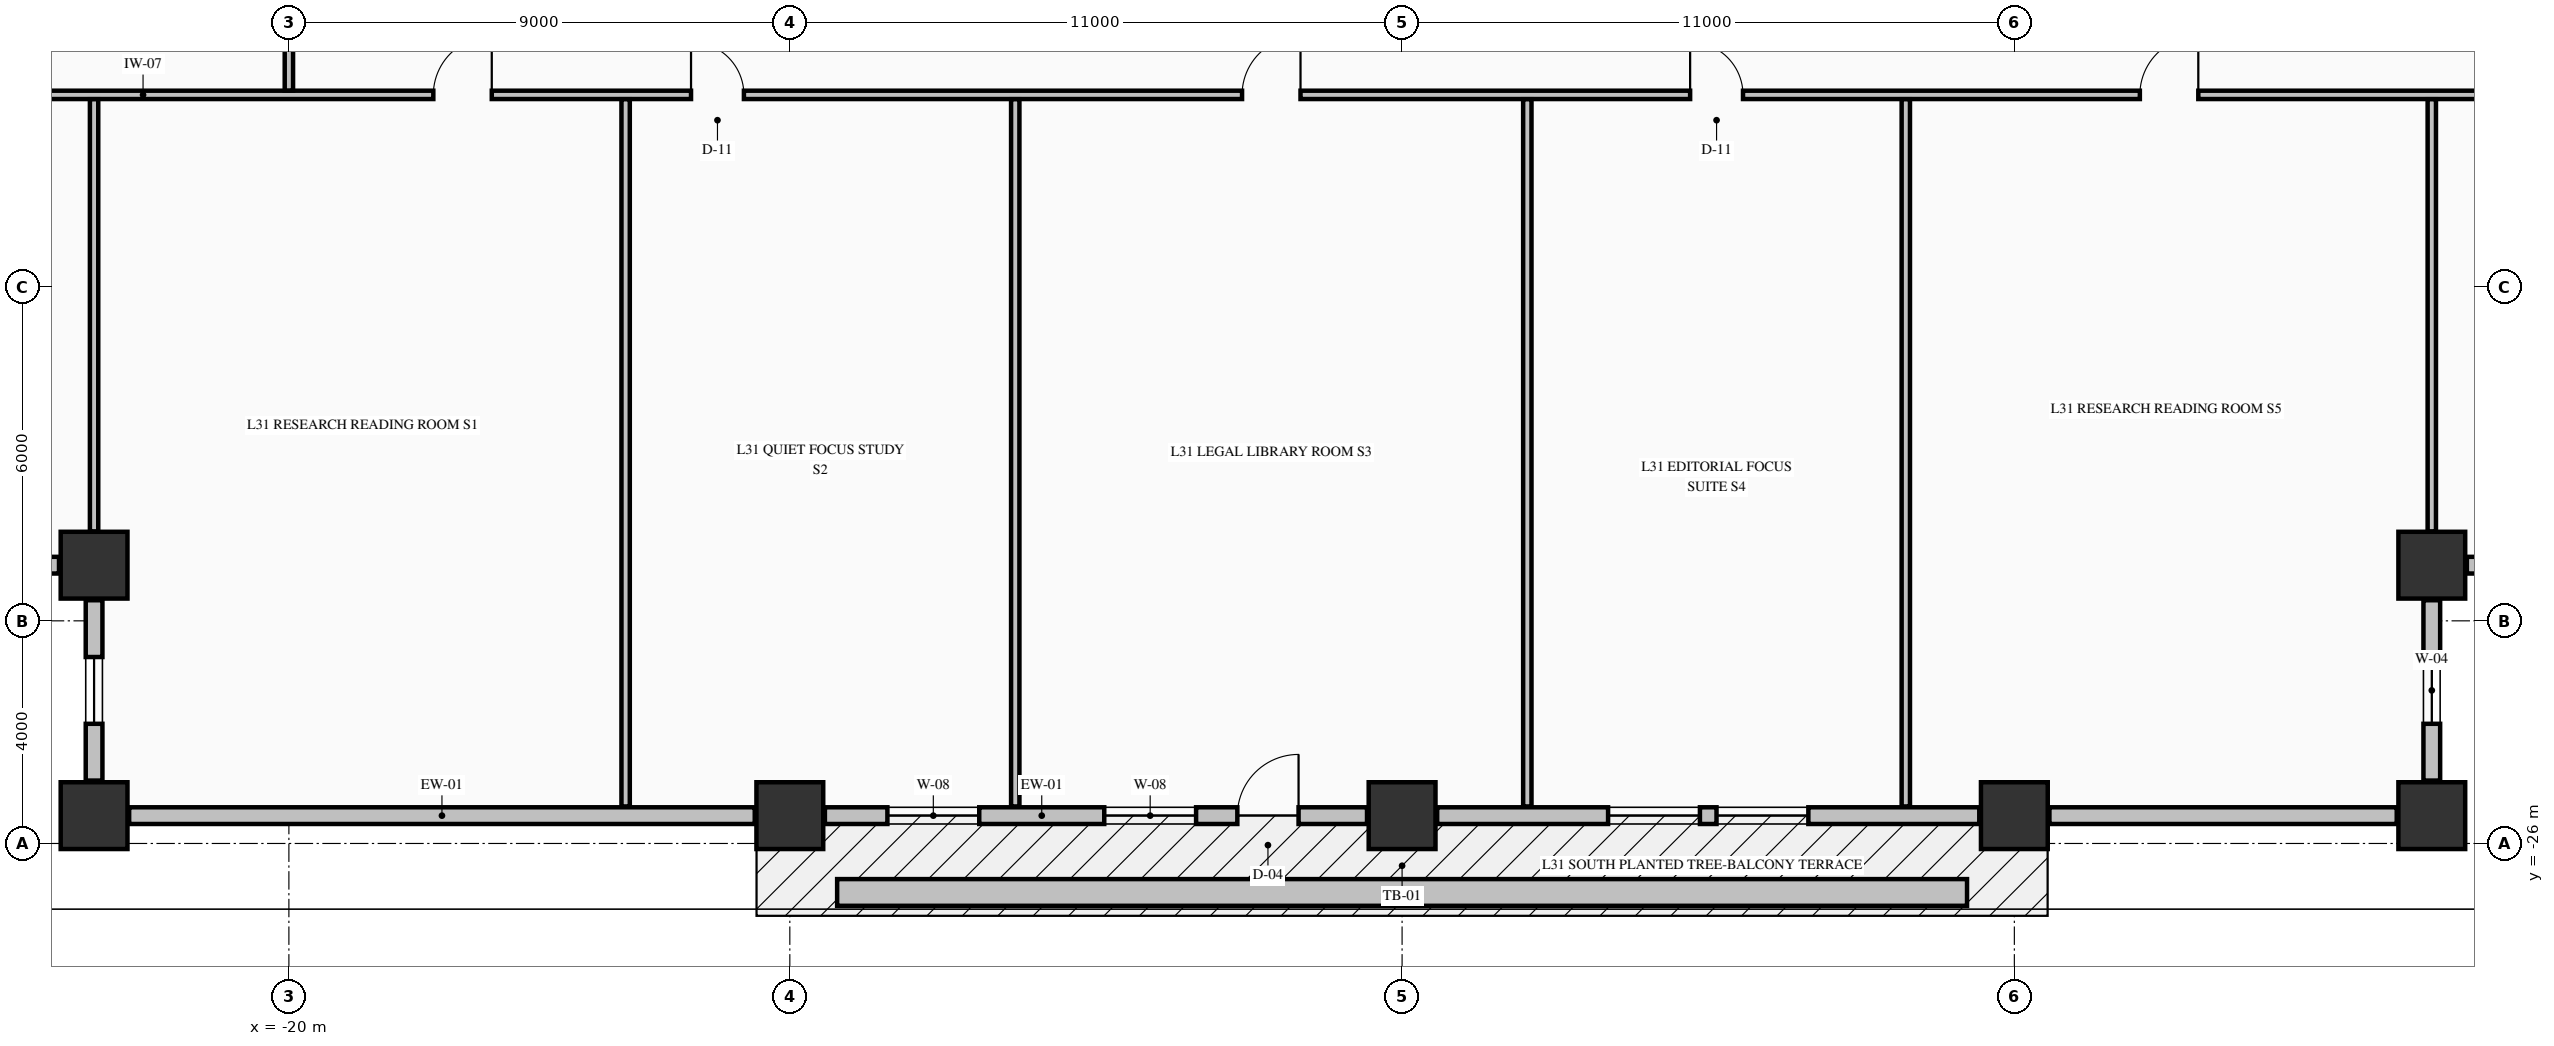
"""IFC4 building model, lengths in metres.
Left out: names, types, materials, properties, quantities, classifications, styles, units other than length and angle.
Written with IfcOpenShell. Run it as: python <this file> out.ifc"""

import sys

from ifc_helpers import new_model, si_unit, direction, frame, frame_2d, origin, origin_2d, place, context, subcontext, project, spatial, rectangle, extrude, element, fill, save


model = new_model("IFC4")
c1 = context("Model", 3, precision=1e-05, world=origin(), true_north=direction((0.0, 1.0)))
c2 = subcontext(c1, "Body", "Model", "MODEL_VIEW")
j1 = project(units=[si_unit("LENGTHUNIT", "METRE"), si_unit("PLANEANGLEUNIT", "RADIAN")], contexts=[c1])
p1 = place(None, origin())
s1 = spatial("IfcSite", under=j1, at=p1, CompositionType="ELEMENT")
p2 = place(p1, origin())
s2 = spatial("IfcBuilding", under=s1, at=p2, CompositionType="ELEMENT")
p3 = place(p2, frame((0.0, 0.0, 124.92)))
s3 = spatial("IfcBuildingStorey", under=s2, at=p3, CompositionType="ELEMENT", Elevation=124.92)
for number, where, z_axis, x_axis in (
    (1, (-23.5, -25.5, -0.25), (0.0, 0.0, 1.0), (1.0, 0.0, 0.0)),
    (2, (-11.0, -25.5, -0.25), (0.0, 0.0, 1.0), (1.0, 0.0, 0.0)),
    (3, (0.0, -25.5, -0.25), (0.0, 0.0, 1.0), (1.0, 0.0, 0.0)),
    (4, (11.0, -25.5, -0.25), (0.0, 0.0, 1.0), (1.0, 0.0, 0.0)),
    (5, (18.5, -25.5, -0.25), (0.0, 0.0, 1.0), (1.0, 0.0, 0.0)),
    (6, (-23.5, -21.0, -0.25), (0.0, 0.0, 1.0), (1.0, 0.0, 0.0)),
    (7, (18.5, -21.0, -0.25), (0.0, 0.0, 1.0), (1.0, 0.0, 0.0)),
):
    element("IfcColumn", number, at=place(p3, frame(where, z_axis=z_axis, x_axis=x_axis)), inside=s3, PredefinedType="COLUMN", context=c2, shape_type="SweptSolid", body=[
        extrude(rectangle(XDim=1.2, YDim=1.2, at=origin_2d()), origin(), (0.0, 0.0, 1.0), 3.57),
    ])
p4 = place(p3, frame((18.5, -24.87, 0.0), z_axis=(0.0, 0.0, 1.0), x_axis=(0.0, 1.0, 0.0)))
e8 = element("IfcWall", 8, at=p4, inside=s3, PredefinedType="STANDARD", context=c2, shape_type="SweptSolid", body=[
    extrude(rectangle(XDim=3.24, YDim=0.3, at=frame_2d((1.62, 0.0))), origin(), (0.0, 0.0, 1.0), 2.712),
])
p5 = place(p4, frame((1.02, 0.0, 0.82)))
e9 = element("IfcOpeningElement", 9, at=p5, cuts=e8, PredefinedType="OPENING", context=c2, shape_type="SweptSolid", body=[
    extrude(rectangle(XDim=1.2, YDim=1.65, at=frame_2d((0.6, 0.825))), frame((0.0, 0.16, 0.0), z_axis=(0.0, -1.0, 0.0), x_axis=(1.0, 0.0, 0.0)), (0.0, 0.0, 1.0), 0.32),
])
p6 = place(p3, frame((19.13, -21.0, 0.0), z_axis=(0.0, 0.0, 1.0), x_axis=(1.0, 0.0, 0.0)))
e10 = element("IfcWall", 10, at=p6, inside=s3, PredefinedType="STANDARD", context=c2, shape_type="SweptSolid", body=[
    extrude(rectangle(XDim=3.24, YDim=0.3, at=frame_2d((1.62, 0.0))), origin(), (0.0, 0.0, 1.0), 2.712),
])
p7 = place(p6, frame((1.02, 0.0, 0.82)))
e11 = element("IfcOpeningElement", 11, at=p7, cuts=e10, PredefinedType="OPENING", context=c2, shape_type="SweptSolid", body=[
    extrude(rectangle(XDim=1.2, YDim=1.65, at=frame_2d((0.6, 0.825))), frame((0.0, 0.16, 0.0), z_axis=(0.0, -1.0, 0.0), x_axis=(1.0, 0.0, 0.0)), (0.0, 0.0, 1.0), 0.32),
])
p8 = place(p3, frame((-27.37, -21.0, 0.0), z_axis=(0.0, 0.0, 1.0), x_axis=(1.0, 0.0, 0.0)))
e12 = element("IfcWall", 12, at=p8, inside=s3, PredefinedType="STANDARD", context=c2, shape_type="SweptSolid", body=[
    extrude(rectangle(XDim=3.24, YDim=0.3, at=frame_2d((1.62, 0.0))), origin(), (0.0, 0.0, 1.0), 2.712),
])
p9 = place(p8, frame((1.02, 0.0, 0.82)))
e13 = element("IfcOpeningElement", 13, at=p9, cuts=e12, PredefinedType="OPENING", context=c2, shape_type="SweptSolid", body=[
    extrude(rectangle(XDim=1.2, YDim=1.65, at=frame_2d((0.6, 0.825))), frame((0.0, 0.16, 0.0), z_axis=(0.0, -1.0, 0.0), x_axis=(1.0, 0.0, 0.0)), (0.0, 0.0, 1.0), 0.32),
])
p10 = place(p3, frame((-23.5, -21.63, 0.0), z_axis=(0.0, 0.0, 1.0), x_axis=(0.0, -1.0, 0.0)))
e14 = element("IfcWall", 14, at=p10, inside=s3, PredefinedType="STANDARD", context=c2, shape_type="SweptSolid", body=[
    extrude(rectangle(XDim=3.24, YDim=0.3, at=frame_2d((1.62, 0.0))), origin(), (0.0, 0.0, 1.0), 2.712),
])
p11 = place(p10, frame((1.02, 0.0, 0.82)))
e15 = element("IfcOpeningElement", 15, at=p11, cuts=e14, PredefinedType="OPENING", context=c2, shape_type="SweptSolid", body=[
    extrude(rectangle(XDim=1.2, YDim=1.65, at=frame_2d((0.6, 0.825))), frame((0.0, 0.16, 0.0), z_axis=(0.0, -1.0, 0.0), x_axis=(1.0, 0.0, 0.0)), (0.0, 0.0, 1.0), 0.32),
])
p12 = place(p3, frame((-22.87, -25.5, 0.0), z_axis=(0.0, 0.0, 1.0), x_axis=(1.0, 0.0, 0.0)))
e16 = element("IfcWall", 16, at=p12, inside=s3, PredefinedType="STANDARD", context=c2, shape_type="SweptSolid", body=[
    extrude(rectangle(XDim=11.24, YDim=0.3, at=frame_2d((5.62, 0.0))), origin(), (0.0, 0.0, 1.0), 2.712),
])
p13 = place(p3, frame((-10.37, -25.5, 0.0), z_axis=(0.0, 0.0, 1.0), x_axis=(1.0, 0.0, 0.0)))
e17 = element("IfcWall", 17, at=p13, inside=s3, PredefinedType="STANDARD", context=c2, shape_type="SweptSolid", body=[
    extrude(rectangle(XDim=9.74, YDim=0.3, at=frame_2d((4.87, 0.0))), origin(), (0.0, 0.0, 1.0), 2.712),
])
p14 = place(p13, frame((7.41, 0.0, 0.0)))
e18 = element("IfcOpeningElement", 18, at=p14, cuts=e17, PredefinedType="OPENING", context=c2, shape_type="SweptSolid", body=[
    extrude(rectangle(XDim=1.1, YDim=2.15, at=frame_2d((0.55, 1.075))), frame((0.0, 0.16, 0.0), z_axis=(0.0, -1.0, 0.0), x_axis=(1.0, 0.0, 0.0)), (0.0, 0.0, 1.0), 0.32),
])
p15 = place(p13, frame((1.123, 0.0, 0.8)))
e19 = element("IfcOpeningElement", 19, at=p15, cuts=e17, PredefinedType="OPENING", context=c2, shape_type="SweptSolid", body=[
    extrude(rectangle(XDim=1.65, YDim=1.7, at=frame_2d((0.825, 0.85))), frame((0.0, 0.16, 0.0), z_axis=(0.0, -1.0, 0.0), x_axis=(1.0, 0.0, 0.0)), (0.0, 0.0, 1.0), 0.32),
])
p16 = place(p13, frame((5.019, 0.0, 0.8)))
e20 = element("IfcOpeningElement", 20, at=p16, cuts=e17, PredefinedType="OPENING", context=c2, shape_type="SweptSolid", body=[
    extrude(rectangle(XDim=1.65, YDim=1.7, at=frame_2d((0.825, 0.85))), frame((0.0, 0.16, 0.0), z_axis=(0.0, -1.0, 0.0), x_axis=(1.0, 0.0, 0.0)), (0.0, 0.0, 1.0), 0.32),
])
p17 = place(p3, frame((0.63, -25.5, 0.0), z_axis=(0.0, 0.0, 1.0), x_axis=(1.0, 0.0, 0.0)))
e21 = element("IfcWall", 21, at=p17, inside=s3, PredefinedType="STANDARD", context=c2, shape_type="SweptSolid", body=[
    extrude(rectangle(XDim=9.74, YDim=0.3, at=frame_2d((4.87, 0.0))), origin(), (0.0, 0.0, 1.0), 2.712),
])
p18 = place(p17, frame((3.071, 0.0, 0.8)))
e22 = element("IfcOpeningElement", 22, at=p18, cuts=e21, PredefinedType="OPENING", context=c2, shape_type="SweptSolid", body=[
    extrude(rectangle(XDim=1.65, YDim=1.7, at=frame_2d((0.825, 0.85))), frame((0.0, 0.16, 0.0), z_axis=(0.0, -1.0, 0.0), x_axis=(1.0, 0.0, 0.0)), (0.0, 0.0, 1.0), 0.32),
])
p19 = place(p17, frame((5.019, 0.0, 0.8)))
e23 = element("IfcOpeningElement", 23, at=p19, cuts=e21, PredefinedType="OPENING", context=c2, shape_type="SweptSolid", body=[
    extrude(rectangle(XDim=1.65, YDim=1.7, at=frame_2d((0.825, 0.85))), frame((0.0, 0.16, 0.0), z_axis=(0.0, -1.0, 0.0), x_axis=(1.0, 0.0, 0.0)), (0.0, 0.0, 1.0), 0.32),
])
p20 = place(p3, frame((11.63, -25.5, 0.0), z_axis=(0.0, 0.0, 1.0), x_axis=(1.0, 0.0, 0.0)))
e24 = element("IfcWall", 24, at=p20, inside=s3, PredefinedType="STANDARD", context=c2, shape_type="SweptSolid", body=[
    extrude(rectangle(XDim=6.24, YDim=0.3, at=frame_2d((3.12, 0.0))), origin(), (0.0, 0.0, 1.0), 2.712),
])
p21 = place(p3, frame((-27.835, -12.55, 0.0), z_axis=(0.0, 0.0, 1.0), x_axis=(1.0, 0.0, 0.0)))
e25 = element("IfcWall", 25, at=p21, inside=s3, PredefinedType="PARTITIONING", context=c2, shape_type="SweptSolid", body=[
    extrude(rectangle(XDim=50.67, YDim=0.15, at=frame_2d((25.335, 0.0))), origin(), (0.0, 0.0, 1.0), 3.32),
])
p22 = place(p21, frame((10.43, 0.0, 0.0)))
e26 = element("IfcOpeningElement", 26, at=p22, cuts=e25, PredefinedType="OPENING", context=c2, shape_type="SweptSolid", body=[
    extrude(rectangle(XDim=1.05, YDim=2.15, at=frame_2d((0.525, 1.075))), frame((0.0, 0.085, 0.0), z_axis=(0.0, -1.0, 0.0), x_axis=(1.0, 0.0, 0.0)), (0.0, 0.0, 1.0), 0.17),
])
p23 = place(p21, frame((15.06, 0.0, 0.0)))
e27 = element("IfcOpeningElement", 27, at=p23, cuts=e25, PredefinedType="OPENING", context=c2, shape_type="SweptSolid", body=[
    extrude(rectangle(XDim=0.95, YDim=2.15, at=frame_2d((0.475, 1.075))), frame((0.0, 0.085, 0.0), z_axis=(0.0, -1.0, 0.0), x_axis=(1.0, 0.0, 0.0)), (0.0, 0.0, 1.0), 0.17),
])
p24 = place(p21, frame((24.96, 0.0, 0.0)))
e28 = element("IfcOpeningElement", 28, at=p24, cuts=e25, PredefinedType="OPENING", context=c2, shape_type="SweptSolid", body=[
    extrude(rectangle(XDim=1.05, YDim=2.15, at=frame_2d((0.525, 1.075))), frame((0.0, 0.085, 0.0), z_axis=(0.0, -1.0, 0.0), x_axis=(1.0, 0.0, 0.0)), (0.0, 0.0, 1.0), 0.17),
])
p25 = place(p21, frame((33.01, 0.0, 0.0)))
e29 = element("IfcOpeningElement", 29, at=p25, cuts=e25, PredefinedType="OPENING", context=c2, shape_type="SweptSolid", body=[
    extrude(rectangle(XDim=0.95, YDim=2.15, at=frame_2d((0.475, 1.075))), frame((0.0, 0.085, 0.0), z_axis=(0.0, -1.0, 0.0), x_axis=(1.0, 0.0, 0.0)), (0.0, 0.0, 1.0), 0.17),
])
p26 = place(p21, frame((41.09, 0.0, 0.0)))
e30 = element("IfcOpeningElement", 30, at=p26, cuts=e25, PredefinedType="OPENING", context=c2, shape_type="SweptSolid", body=[
    extrude(rectangle(XDim=1.05, YDim=2.15, at=frame_2d((0.525, 1.075))), frame((0.0, 0.085, 0.0), z_axis=(0.0, -1.0, 0.0), x_axis=(1.0, 0.0, 0.0)), (0.0, 0.0, 1.0), 0.17),
])
p27 = place(p3, frame((-23.5, -20.394, 0.0), z_axis=(0.0, 0.0, 1.0), x_axis=(0.0, 1.0, 0.0)))
e31 = element("IfcWall", 31, at=p27, inside=s3, PredefinedType="PARTITIONING", context=c2, shape_type="SweptSolid", body=[
    extrude(rectangle(XDim=7.766, YDim=0.15, at=frame_2d((3.883, 0.0))), origin(), (0.0, 0.0, 1.0), 3.32),
])
p28 = place(p3, frame((-20.0, -12.472, 0.0), z_axis=(0.0, 0.0, 1.0), x_axis=(0.0, 1.0, 0.0)))
e32 = element("IfcWall", 32, at=p28, inside=s3, PredefinedType="PARTITIONING", context=c2, shape_type="SweptSolid", body=[
    extrude(rectangle(XDim=2.016, YDim=0.15, at=frame_2d((1.008, 0.0))), origin(), (0.0, 0.0, 1.0), 2.81),
])
p29 = place(p28, frame((0.747, 0.0, 0.0)))
e33 = element("IfcOpeningElement", 33, at=p29, cuts=e32, PredefinedType="OPENING", context=c2, shape_type="SweptSolid", body=[
    extrude(rectangle(XDim=0.95, YDim=2.15, at=frame_2d((0.475, 1.075))), frame((0.0, 0.085, 0.0), z_axis=(0.0, -1.0, 0.0), x_axis=(1.0, 0.0, 0.0)), (0.0, 0.0, 1.0), 0.17),
])
for number, where, z_axis, x_axis in (
    (34, (-13.95, -25.335, 0.0), (0.0, 0.0, 1.0), (0.0, 1.0, 0.0)),
    (35, (-6.95, -25.335, 0.0), (0.0, 0.0, 1.0), (0.0, 1.0, 0.0)),
    (36, (2.25, -25.335, 0.0), (0.0, 0.0, 1.0), (0.0, 1.0, 0.0)),
    (37, (9.05, -25.335, 0.0), (0.0, 0.0, 1.0), (0.0, 1.0, 0.0)),
):
    element("IfcWall", number, at=place(p3, frame(where, z_axis=z_axis, x_axis=x_axis)), inside=s3, PredefinedType="PARTITIONING", context=c2, shape_type="SweptSolid", body=[
        extrude(rectangle(XDim=12.707, YDim=0.15, at=frame_2d((6.354, 0.0))), origin(), (0.0, 0.0, 1.0), 3.32),
    ])
p30 = place(p3, frame((18.5, -20.394, 0.0), z_axis=(0.0, 0.0, 1.0), x_axis=(0.0, 1.0, 0.0)))
e38 = element("IfcWall", 38, at=p30, inside=s3, PredefinedType="PARTITIONING", context=c2, shape_type="SweptSolid", body=[
    extrude(rectangle(XDim=7.766, YDim=0.15, at=frame_2d((3.883, 0.0))), origin(), (0.0, 0.0, 1.0), 3.32),
])
p31 = place(p3, frame((-10.15, -26.88, -0.04), z_axis=(0.0, 0.0, 1.0), x_axis=(1.0, 0.0, 0.0)))
e39 = element("IfcWall", 39, at=p31, inside=s3, PredefinedType="PARAPET", context=c2, shape_type="SweptSolid", body=[
    extrude(rectangle(XDim=20.3, YDim=0.48, at=frame_2d((10.15, 0.0))), origin(), (0.0, 0.0, 1.0), 0.52),
])
p32 = place(p5, origin())
e40 = element("IfcWindow", 40, at=p32, inside=s3, PartitioningType="SINGLE_PANEL", PredefinedType="WINDOW", context=c2, shape_type="SweptSolid", body=[
    extrude(rectangle(XDim=1.2, YDim=1.65, at=frame_2d((0.6, 0.825))), frame((0.0, 0.03, 0.0), z_axis=(0.0, -1.0, 0.0), x_axis=(1.0, 0.0, 0.0)), (0.0, 0.0, 1.0), 0.06),
])
fill(e9, e40)
p33 = place(p11, origin())
e41 = element("IfcWindow", 41, at=p33, inside=s3, PartitioningType="SINGLE_PANEL", PredefinedType="WINDOW", context=c2, shape_type="SweptSolid", body=[
    extrude(rectangle(XDim=1.2, YDim=1.65, at=frame_2d((0.6, 0.825))), frame((0.0, 0.03, 0.0), z_axis=(0.0, -1.0, 0.0), x_axis=(1.0, 0.0, 0.0)), (0.0, 0.0, 1.0), 0.06),
])
fill(e15, e41)
p34 = place(p14, origin())
e42 = element("IfcDoor", 42, at=p34, inside=s3, OperationType="SINGLE_SWING_RIGHT", PredefinedType="DOOR", context=c2, shape_type="SweptSolid", body=[
    extrude(rectangle(XDim=1.1, YDim=2.15, at=frame_2d((0.55, 1.075))), frame((0.0, 0.025, 0.0), z_axis=(0.0, -1.0, 0.0), x_axis=(1.0, 0.0, 0.0)), (0.0, 0.0, 1.0), 0.05),
])
fill(e18, e42)
p35 = place(p15, origin())
e43 = element("IfcWindow", 43, at=p35, inside=s3, PartitioningType="SINGLE_PANEL", PredefinedType="WINDOW", context=c2, shape_type="SweptSolid", body=[
    extrude(rectangle(XDim=1.65, YDim=1.7, at=frame_2d((0.825, 0.85))), frame((0.0, 0.03, 0.0), z_axis=(0.0, -1.0, 0.0), x_axis=(1.0, 0.0, 0.0)), (0.0, 0.0, 1.0), 0.06),
])
fill(e19, e43)
p36 = place(p16, origin())
e44 = element("IfcWindow", 44, at=p36, inside=s3, PartitioningType="SINGLE_PANEL", PredefinedType="WINDOW", context=c2, shape_type="SweptSolid", body=[
    extrude(rectangle(XDim=1.65, YDim=1.7, at=frame_2d((0.825, 0.85))), frame((0.0, 0.03, 0.0), z_axis=(0.0, -1.0, 0.0), x_axis=(1.0, 0.0, 0.0)), (0.0, 0.0, 1.0), 0.06),
])
fill(e20, e44)
p37 = place(p18, origin())
e45 = element("IfcWindow", 45, at=p37, inside=s3, PartitioningType="SINGLE_PANEL", PredefinedType="WINDOW", context=c2, shape_type="SweptSolid", body=[
    extrude(rectangle(XDim=1.65, YDim=1.7, at=frame_2d((0.825, 0.85))), frame((0.0, 0.03, 0.0), z_axis=(0.0, -1.0, 0.0), x_axis=(1.0, 0.0, 0.0)), (0.0, 0.0, 1.0), 0.06),
])
fill(e22, e45)
p38 = place(p19, origin())
e46 = element("IfcWindow", 46, at=p38, inside=s3, PartitioningType="SINGLE_PANEL", PredefinedType="WINDOW", context=c2, shape_type="SweptSolid", body=[
    extrude(rectangle(XDim=1.65, YDim=1.7, at=frame_2d((0.825, 0.85))), frame((0.0, 0.03, 0.0), z_axis=(0.0, -1.0, 0.0), x_axis=(1.0, 0.0, 0.0)), (0.0, 0.0, 1.0), 0.06),
])
fill(e23, e46)
p39 = place(p22, origin())
e47 = element("IfcDoor", 47, at=p39, inside=s3, OperationType="SINGLE_SWING_RIGHT", PredefinedType="DOOR", context=c2, shape_type="SweptSolid", body=[
    extrude(rectangle(XDim=1.05, YDim=2.15, at=frame_2d((0.525, 1.075))), frame((0.0, 0.025, 0.0), z_axis=(0.0, -1.0, 0.0), x_axis=(1.0, 0.0, 0.0)), (0.0, 0.0, 1.0), 0.05),
])
fill(e26, e47)
p40 = place(p23, origin())
e48 = element("IfcDoor", 48, at=p40, inside=s3, OperationType="SINGLE_SWING_LEFT", PredefinedType="DOOR", context=c2, shape_type="SweptSolid", body=[
    extrude(rectangle(XDim=0.95, YDim=2.15, at=frame_2d((0.475, 1.075))), frame((0.0, 0.025, 0.0), z_axis=(0.0, -1.0, 0.0), x_axis=(1.0, 0.0, 0.0)), (0.0, 0.0, 1.0), 0.05),
])
fill(e27, e48)
p41 = place(p24, origin())
e49 = element("IfcDoor", 49, at=p41, inside=s3, OperationType="SINGLE_SWING_RIGHT", PredefinedType="DOOR", context=c2, shape_type="SweptSolid", body=[
    extrude(rectangle(XDim=1.05, YDim=2.15, at=frame_2d((0.525, 1.075))), frame((0.0, 0.025, 0.0), z_axis=(0.0, -1.0, 0.0), x_axis=(1.0, 0.0, 0.0)), (0.0, 0.0, 1.0), 0.05),
])
fill(e28, e49)
p42 = place(p25, origin())
e50 = element("IfcDoor", 50, at=p42, inside=s3, OperationType="SINGLE_SWING_LEFT", PredefinedType="DOOR", context=c2, shape_type="SweptSolid", body=[
    extrude(rectangle(XDim=0.95, YDim=2.15, at=frame_2d((0.475, 1.075))), frame((0.0, 0.025, 0.0), z_axis=(0.0, -1.0, 0.0), x_axis=(1.0, 0.0, 0.0)), (0.0, 0.0, 1.0), 0.05),
])
fill(e29, e50)
p43 = place(p26, origin())
e51 = element("IfcDoor", 51, at=p43, inside=s3, OperationType="SINGLE_SWING_RIGHT", PredefinedType="DOOR", context=c2, shape_type="SweptSolid", body=[
    extrude(rectangle(XDim=1.05, YDim=2.15, at=frame_2d((0.525, 1.075))), frame((0.0, 0.025, 0.0), z_axis=(0.0, -1.0, 0.0), x_axis=(1.0, 0.0, 0.0)), (0.0, 0.0, 1.0), 0.05),
])
fill(e30, e51)
save(model, sys.argv[1])
